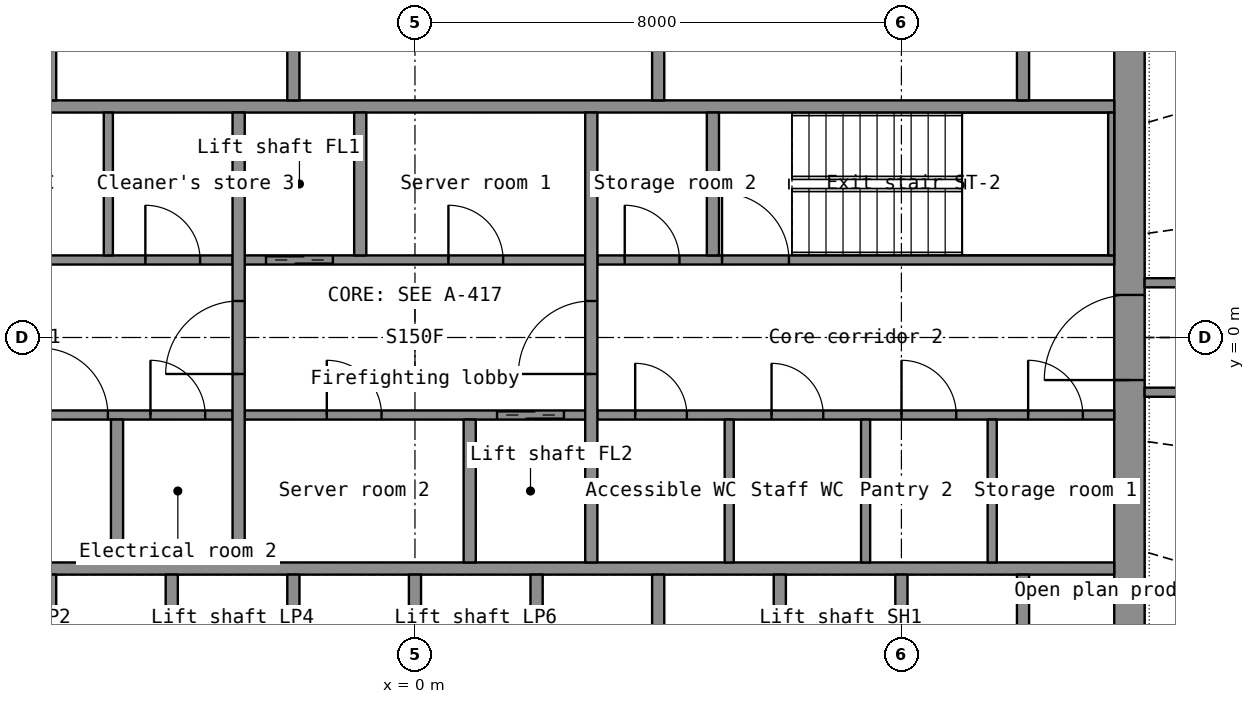
"""IFC4 building model, lengths in metres.
Left out: names, types, materials, properties, quantities, classifications, styles, units other than length and angle.
Written with IfcOpenShell. Run it as: python <this file> out.ifc"""

import sys

from ifc_helpers import new_model, si_unit, direction, frame, frame_2d, origin, place, context, subcontext, project, spatial, rectangle, extrude, element, fill, save


model = new_model("IFC4")
c1 = context("Model", 3, precision=1e-05, world=origin(), true_north=direction((0.0, 1.0)))
c2 = subcontext(c1, "Body", "Model", "MODEL_VIEW")
j1 = project(units=[si_unit("LENGTHUNIT", "METRE"), si_unit("PLANEANGLEUNIT", "RADIAN")], contexts=[c1])
p1 = place(None, origin())
s1 = spatial("IfcSite", under=j1, at=p1, CompositionType="ELEMENT")
p2 = place(p1, origin())
s2 = spatial("IfcBuilding", under=s1, at=p2, CompositionType="ELEMENT")
p3 = place(p2, frame((0.0, 0.0, 119.3)))
s3 = spatial("IfcBuildingStorey", under=s2, at=p3, CompositionType="ELEMENT", Elevation=119.3)
p4 = place(p3, frame((11.75, -7.2, 0.0), z_axis=(0.0, 0.0, 1.0), x_axis=(0.0, 1.0, 0.0)))
e1 = element("IfcWall", 1, at=p4, inside=s3, PredefinedType="SHEAR", context=c2, shape_type="SweptSolid", body=[
    extrude(rectangle(XDim=14.4, YDim=0.5, at=frame_2d((7.2, 0.0))), origin(), (0.0, 0.0, 1.0), 3.3),
])
p5 = place(p4, frame((6.5, 0.0, 0.0)))
e2 = element("IfcOpeningElement", 2, at=p5, cuts=e1, PredefinedType="OPENING", context=c2, shape_type="SweptSolid", body=[
    extrude(rectangle(XDim=1.4, YDim=2.2, at=frame_2d((0.7, 1.1))), frame((0.0, 0.26, 0.0), z_axis=(0.0, -1.0, 0.0), x_axis=(1.0, 0.0, 0.0)), (0.0, 0.0, 1.0), 0.52),
])
for number, where, z_axis, x_axis in (
    (3, (-11.5, -3.8, 0.0), (0.0, 0.0, 1.0), (1.0, 0.0, 0.0)),
    (4, (-11.5, 3.8, 0.0), (0.0, 0.0, 1.0), (1.0, 0.0, 0.0)),
):
    element("IfcWall", number, at=place(p3, frame(where, z_axis=z_axis, x_axis=x_axis)), inside=s3, PredefinedType="SHEAR", context=c2, shape_type="SweptSolid", body=[
        extrude(rectangle(XDim=23.0, YDim=0.2, at=frame_2d((11.5, 0.0))), origin(), (0.0, 0.0, 1.0), 3.3),
    ])
for number, where, z_axis, x_axis in (
    (5, (-6.0, -6.7, 0.0), (0.0, 0.0, 1.0), (0.0, 1.0, 0.0)),
    (6, (-4.0, -6.7, 0.0), (0.0, 0.0, 1.0), (0.0, 1.0, 0.0)),
    (7, (-2.0, -6.7, 0.0), (0.0, 0.0, 1.0), (0.0, 1.0, 0.0)),
    (8, (0.0, -6.7, 0.0), (0.0, 0.0, 1.0), (0.0, 1.0, 0.0)),
    (9, (2.0, -6.7, 0.0), (0.0, 0.0, 1.0), (0.0, 1.0, 0.0)),
    (10, (4.0, -6.7, 0.0), (0.0, 0.0, 1.0), (0.0, 1.0, 0.0)),
    (11, (6.0, -6.7, 0.0), (0.0, 0.0, 1.0), (0.0, 1.0, 0.0)),
    (12, (8.0, -6.7, 0.0), (0.0, 0.0, 1.0), (0.0, 1.0, 0.0)),
    (13, (10.0, -6.7, 0.0), (0.0, 0.0, 1.0), (0.0, 1.0, 0.0)),
    (14, (-6.0, 3.9, 0.0), (0.0, 0.0, 1.0), (0.0, 1.0, 0.0)),
    (15, (10.0, 3.9, 0.0), (0.0, 0.0, 1.0), (0.0, 1.0, 0.0)),
):
    element("IfcWall", number, at=place(p3, frame(where, z_axis=z_axis, x_axis=x_axis)), inside=s3, PredefinedType="SHEAR", context=c2, shape_type="SweptSolid", body=[
        extrude(rectangle(XDim=2.8, YDim=0.2, at=frame_2d((1.4, 0.0))), origin(), (0.0, 0.0, 1.0), 3.3),
    ])
for number, where, z_axis, x_axis in (
    (16, (-2.0, 3.9, 0.0), (0.0, 0.0, 1.0), (0.0, 1.0, 0.0)),
    (17, (4.0, 3.9, 0.0), (0.0, 0.0, 1.0), (0.0, 1.0, 0.0)),
):
    element("IfcWall", number, at=place(p3, frame(where, z_axis=z_axis, x_axis=x_axis)), inside=s3, PredefinedType="PARTITIONING", context=c2, shape_type="SweptSolid", body=[
        extrude(rectangle(XDim=2.8, YDim=0.2, at=frame_2d((1.4, 0.0))), origin(), (0.0, 0.0, 1.0), 3.3),
    ])
p6 = place(p3, frame((-11.5, -1.275, 0.0), z_axis=(0.0, 0.0, 1.0), x_axis=(1.0, 0.0, 0.0)))
e18 = element("IfcWall", 18, at=p6, inside=s3, PredefinedType="SHEAR", context=c2, shape_type="SweptSolid", body=[
    extrude(rectangle(XDim=8.5, YDim=0.15, at=frame_2d((4.25, 0.0))), origin(), (0.0, 0.0, 1.0), 3.3),
])
p7 = place(p6, frame((5.35, 0.0, 0.0)))
e19 = element("IfcOpeningElement", 19, at=p7, cuts=e18, PredefinedType="OPENING", context=c2, shape_type="SweptSolid", body=[
    extrude(rectangle(XDim=1.1, YDim=2.15, at=frame_2d((0.55, 1.075))), frame((0.0, 0.085, 0.0), z_axis=(0.0, -1.0, 0.0), x_axis=(1.0, 0.0, 0.0)), (0.0, 0.0, 1.0), 0.17),
])
p8 = place(p6, frame((7.15, 0.0, 0.0)))
e20 = element("IfcOpeningElement", 20, at=p8, cuts=e18, PredefinedType="OPENING", context=c2, shape_type="SweptSolid", body=[
    extrude(rectangle(XDim=0.9, YDim=2.1, at=frame_2d((0.45, 1.05))), frame((0.0, 0.085, 0.0), z_axis=(0.0, -1.0, 0.0), x_axis=(1.0, 0.0, 0.0)), (0.0, 0.0, 1.0), 0.17),
])
p9 = place(p3, frame((-2.8, -1.275, 0.0), z_axis=(0.0, 0.0, 1.0), x_axis=(1.0, 0.0, 0.0)))
e21 = element("IfcWall", 21, at=p9, inside=s3, PredefinedType="SHEAR", context=c2, shape_type="SweptSolid", body=[
    extrude(rectangle(XDim=5.6, YDim=0.15, at=frame_2d((2.8, 0.0))), origin(), (0.0, 0.0, 1.0), 3.3),
])
p10 = place(p9, frame((4.15, 0.0, 0.0)))
e22 = element("IfcOpeningElement", 22, at=p10, cuts=e21, PredefinedType="OPENING", context=c2, shape_type="SweptSolid", body=[
    extrude(rectangle(XDim=1.1, YDim=2.2, at=frame_2d((0.55, 1.1))), frame((0.0, 0.085, 0.0), z_axis=(0.0, -1.0, 0.0), x_axis=(1.0, 0.0, 0.0)), (0.0, 0.0, 1.0), 0.17),
])
p11 = place(p9, frame((1.35, 0.0, 0.0)))
e23 = element("IfcOpeningElement", 23, at=p11, cuts=e21, PredefinedType="OPENING", context=c2, shape_type="SweptSolid", body=[
    extrude(rectangle(XDim=0.9, YDim=2.1, at=frame_2d((0.45, 1.05))), frame((0.0, 0.085, 0.0), z_axis=(0.0, -1.0, 0.0), x_axis=(1.0, 0.0, 0.0)), (0.0, 0.0, 1.0), 0.17),
])
p12 = place(p3, frame((3.0, -1.275, 0.0), z_axis=(0.0, 0.0, 1.0), x_axis=(1.0, 0.0, 0.0)))
e24 = element("IfcWall", 24, at=p12, inside=s3, PredefinedType="PARTITIONING", context=c2, shape_type="SweptSolid", body=[
    extrude(rectangle(XDim=8.5, YDim=0.15, at=frame_2d((4.25, 0.0))), origin(), (0.0, 0.0, 1.0), 3.3),
])
p13 = place(p12, frame((0.622, 0.0, 0.0)))
e25 = element("IfcOpeningElement", 25, at=p13, cuts=e24, PredefinedType="OPENING", context=c2, shape_type="SweptSolid", body=[
    extrude(rectangle(XDim=0.85, YDim=2.1, at=frame_2d((0.425, 1.05))), frame((0.0, 0.085, 0.0), z_axis=(0.0, -1.0, 0.0), x_axis=(1.0, 0.0, 0.0)), (0.0, 0.0, 1.0), 0.17),
])
p14 = place(p12, frame((2.865, 0.0, 0.0)))
e26 = element("IfcOpeningElement", 26, at=p14, cuts=e24, PredefinedType="OPENING", context=c2, shape_type="SweptSolid", body=[
    extrude(rectangle(XDim=0.85, YDim=2.1, at=frame_2d((0.425, 1.05))), frame((0.0, 0.085, 0.0), z_axis=(0.0, -1.0, 0.0), x_axis=(1.0, 0.0, 0.0)), (0.0, 0.0, 1.0), 0.17),
])
p15 = place(p12, frame((5.002, 0.0, 0.0)))
e27 = element("IfcOpeningElement", 27, at=p15, cuts=e24, PredefinedType="OPENING", context=c2, shape_type="SweptSolid", body=[
    extrude(rectangle(XDim=0.9, YDim=2.1, at=frame_2d((0.45, 1.05))), frame((0.0, 0.085, 0.0), z_axis=(0.0, -1.0, 0.0), x_axis=(1.0, 0.0, 0.0)), (0.0, 0.0, 1.0), 0.17),
])
p16 = place(p12, frame((7.084, 0.0, 0.0)))
e28 = element("IfcOpeningElement", 28, at=p16, cuts=e24, PredefinedType="OPENING", context=c2, shape_type="SweptSolid", body=[
    extrude(rectangle(XDim=0.9, YDim=2.1, at=frame_2d((0.45, 1.05))), frame((0.0, 0.085, 0.0), z_axis=(0.0, -1.0, 0.0), x_axis=(1.0, 0.0, 0.0)), (0.0, 0.0, 1.0), 0.17),
])
p17 = place(p3, frame((-11.5, 1.275, 0.0), z_axis=(0.0, 0.0, 1.0), x_axis=(1.0, 0.0, 0.0)))
e29 = element("IfcWall", 29, at=p17, inside=s3, PredefinedType="PARTITIONING", context=c2, shape_type="SweptSolid", body=[
    extrude(rectangle(XDim=8.5, YDim=0.15, at=frame_2d((4.25, 0.0))), origin(), (0.0, 0.0, 1.0), 3.3),
])
p18 = place(p17, frame((1.133, 0.0, 0.0)))
e30 = element("IfcOpeningElement", 30, at=p18, cuts=e29, PredefinedType="OPENING", context=c2, shape_type="SweptSolid", body=[
    extrude(rectangle(XDim=0.85, YDim=2.1, at=frame_2d((0.425, 1.05))), frame((0.0, 0.085, 0.0), z_axis=(0.0, -1.0, 0.0), x_axis=(1.0, 0.0, 0.0)), (0.0, 0.0, 1.0), 0.17),
])
p19 = place(p17, frame((4.399, 0.0, 0.0)))
e31 = element("IfcOpeningElement", 31, at=p19, cuts=e29, PredefinedType="OPENING", context=c2, shape_type="SweptSolid", body=[
    extrude(rectangle(XDim=0.85, YDim=2.1, at=frame_2d((0.425, 1.05))), frame((0.0, 0.085, 0.0), z_axis=(0.0, -1.0, 0.0), x_axis=(1.0, 0.0, 0.0)), (0.0, 0.0, 1.0), 0.17),
])
p20 = place(p17, frame((7.066, 0.0, 0.0)))
e32 = element("IfcOpeningElement", 32, at=p20, cuts=e29, PredefinedType="OPENING", context=c2, shape_type="SweptSolid", body=[
    extrude(rectangle(XDim=0.9, YDim=2.1, at=frame_2d((0.45, 1.05))), frame((0.0, 0.085, 0.0), z_axis=(0.0, -1.0, 0.0), x_axis=(1.0, 0.0, 0.0)), (0.0, 0.0, 1.0), 0.17),
])
p21 = place(p3, frame((-2.8, 1.275, 0.0), z_axis=(0.0, 0.0, 1.0), x_axis=(1.0, 0.0, 0.0)))
e33 = element("IfcWall", 33, at=p21, inside=s3, PredefinedType="SHEAR", context=c2, shape_type="SweptSolid", body=[
    extrude(rectangle(XDim=5.6, YDim=0.15, at=frame_2d((2.8, 0.0))), origin(), (0.0, 0.0, 1.0), 3.3),
])
p22 = place(p21, frame((0.35, 0.0, 0.0)))
e34 = element("IfcOpeningElement", 34, at=p22, cuts=e33, PredefinedType="OPENING", context=c2, shape_type="SweptSolid", body=[
    extrude(rectangle(XDim=1.1, YDim=2.2, at=frame_2d((0.55, 1.1))), frame((0.0, 0.085, 0.0), z_axis=(0.0, -1.0, 0.0), x_axis=(1.0, 0.0, 0.0)), (0.0, 0.0, 1.0), 0.17),
])
p23 = place(p21, frame((3.35, 0.0, 0.0)))
e35 = element("IfcOpeningElement", 35, at=p23, cuts=e33, PredefinedType="OPENING", context=c2, shape_type="SweptSolid", body=[
    extrude(rectangle(XDim=0.9, YDim=2.1, at=frame_2d((0.45, 1.05))), frame((0.0, 0.085, 0.0), z_axis=(0.0, -1.0, 0.0), x_axis=(1.0, 0.0, 0.0)), (0.0, 0.0, 1.0), 0.17),
])
p24 = place(p3, frame((3.0, 1.275, 0.0), z_axis=(0.0, 0.0, 1.0), x_axis=(1.0, 0.0, 0.0)))
e36 = element("IfcWall", 36, at=p24, inside=s3, PredefinedType="SHEAR", context=c2, shape_type="SweptSolid", body=[
    extrude(rectangle(XDim=8.5, YDim=0.15, at=frame_2d((4.25, 0.0))), origin(), (0.0, 0.0, 1.0), 3.3),
])
p25 = place(p24, frame((2.05, 0.0, 0.0)))
e37 = element("IfcOpeningElement", 37, at=p25, cuts=e36, PredefinedType="OPENING", context=c2, shape_type="SweptSolid", body=[
    extrude(rectangle(XDim=1.1, YDim=2.15, at=frame_2d((0.55, 1.075))), frame((0.0, 0.085, 0.0), z_axis=(0.0, -1.0, 0.0), x_axis=(1.0, 0.0, 0.0)), (0.0, 0.0, 1.0), 0.17),
])
p26 = place(p24, frame((0.45, 0.0, 0.0)))
e38 = element("IfcOpeningElement", 38, at=p26, cuts=e36, PredefinedType="OPENING", context=c2, shape_type="SweptSolid", body=[
    extrude(rectangle(XDim=0.9, YDim=2.1, at=frame_2d((0.45, 1.05))), frame((0.0, 0.085, 0.0), z_axis=(0.0, -1.0, 0.0), x_axis=(1.0, 0.0, 0.0)), (0.0, 0.0, 1.0), 0.17),
])
p27 = place(p3, frame((-2.9, -3.7, 0.0), z_axis=(0.0, 0.0, 1.0), x_axis=(0.0, 1.0, 0.0)))
e39 = element("IfcWall", 39, at=p27, inside=s3, PredefinedType="SHEAR", context=c2, shape_type="SweptSolid", body=[
    extrude(rectangle(XDim=7.4, YDim=0.2, at=frame_2d((3.7, 0.0))), origin(), (0.0, 0.0, 1.0), 3.3),
])
p28 = place(p27, frame((3.1, 0.0, 0.0)))
e40 = element("IfcOpeningElement", 40, at=p28, cuts=e39, PredefinedType="OPENING", context=c2, shape_type="SweptSolid", body=[
    extrude(rectangle(XDim=1.2, YDim=2.2, at=frame_2d((0.6, 1.1))), frame((0.0, 0.11, 0.0), z_axis=(0.0, -1.0, 0.0), x_axis=(1.0, 0.0, 0.0)), (0.0, 0.0, 1.0), 0.22),
])
p29 = place(p3, frame((2.9, -3.7, 0.0), z_axis=(0.0, 0.0, 1.0), x_axis=(0.0, 1.0, 0.0)))
e41 = element("IfcWall", 41, at=p29, inside=s3, PredefinedType="SHEAR", context=c2, shape_type="SweptSolid", body=[
    extrude(rectangle(XDim=7.4, YDim=0.2, at=frame_2d((3.7, 0.0))), origin(), (0.0, 0.0, 1.0), 3.3),
])
p30 = place(p29, frame((3.1, 0.0, 0.0)))
e42 = element("IfcOpeningElement", 42, at=p30, cuts=e41, PredefinedType="OPENING", context=c2, shape_type="SweptSolid", body=[
    extrude(rectangle(XDim=1.2, YDim=2.2, at=frame_2d((0.6, 1.1))), frame((0.0, 0.11, 0.0), z_axis=(0.0, -1.0, 0.0), x_axis=(1.0, 0.0, 0.0)), (0.0, 0.0, 1.0), 0.22),
])
for number, where, z_axis, x_axis in (
    (43, (-0.9, 1.35, 0.0), (0.0, 0.0, 1.0), (0.0, 1.0, 0.0)),
    (44, (0.9, -3.7, 0.0), (0.0, 0.0, 1.0), (0.0, 1.0, 0.0)),
):
    element("IfcWall", number, at=place(p3, frame(where, z_axis=z_axis, x_axis=x_axis)), inside=s3, PredefinedType="SHEAR", context=c2, shape_type="SweptSolid", body=[
        extrude(rectangle(XDim=2.35, YDim=0.2, at=frame_2d((1.175, 0.0))), origin(), (0.0, 0.0, 1.0), 3.3),
    ])
p31 = place(p3, frame((11.45, 1.35, 0.0), z_axis=(0.0, 0.0, 1.0), x_axis=(0.0, 1.0, 0.0)))
e45 = element("IfcWall", 45, at=p31, inside=s3, PredefinedType="SHEAR", context=c2, shape_type="SweptSolid", body=[
    extrude(rectangle(XDim=2.35, YDim=0.1, at=frame_2d((1.175, 0.0))), origin(), (0.0, 0.0, 1.0), 3.3),
])
for number, where, z_axis, x_axis in (
    (46, (-4.9, -3.7, 0.0), (0.0, 0.0, 1.0), (0.0, 1.0, 0.0)),
    (47, (4.9, 1.35, 0.0), (0.0, 0.0, 1.0), (0.0, 1.0, 0.0)),
):
    element("IfcWall", number, at=place(p3, frame(where, z_axis=z_axis, x_axis=x_axis)), inside=s3, PredefinedType="SHEAR", context=c2, shape_type="SweptSolid", body=[
        extrude(rectangle(XDim=2.35, YDim=0.2, at=frame_2d((1.175, 0.0))), origin(), (0.0, 0.0, 1.0), 3.3),
    ])
for number, where, z_axis, x_axis in (
    (48, (-5.043, 1.35, 0.0), (0.0, 0.0, 1.0), (0.0, 1.0, 0.0)),
    (49, (5.168, -3.7, 0.0), (0.0, 0.0, 1.0), (0.0, 1.0, 0.0)),
    (50, (7.411, -3.7, 0.0), (0.0, 0.0, 1.0), (0.0, 1.0, 0.0)),
    (51, (9.493, -3.7, 0.0), (0.0, 0.0, 1.0), (0.0, 1.0, 0.0)),
):
    element("IfcWall", number, at=place(p3, frame(where, z_axis=z_axis, x_axis=x_axis)), inside=s3, PredefinedType="PARTITIONING", context=c2, shape_type="SweptSolid", body=[
        extrude(rectangle(XDim=2.35, YDim=0.15, at=frame_2d((1.175, 0.0))), origin(), (0.0, 0.0, 1.0), 3.3),
    ])
p32 = place(p3, frame((15.923, 0.9, 0.0), z_axis=(0.0, 0.0, 1.0), x_axis=(-1.0, 0.0, 0.0)))
e52 = element("IfcWall", 52, at=p32, inside=s3, PredefinedType="PARTITIONING", context=c2, shape_type="SweptSolid", body=[
    extrude(rectangle(XDim=3.923, YDim=0.15, at=frame_2d((1.961, 0.0))), origin(), (0.0, 0.0, 1.0), 2.4),
])
p33 = place(p3, frame((12.0, -0.9, 0.0), z_axis=(0.0, 0.0, 1.0), x_axis=(1.0, 0.0, 0.0)))
e53 = element("IfcWall", 53, at=p33, inside=s3, PredefinedType="PARTITIONING", context=c2, shape_type="SweptSolid", body=[
    extrude(rectangle(XDim=0.559, YDim=0.15, at=frame_2d((0.28, 0.0))), origin(), (0.0, 0.0, 1.0), 2.4),
])
p34 = place(p5, origin())
e54 = element("IfcDoor", 54, at=p34, inside=s3, OperationType="DOUBLE_DOOR_SINGLE_SWING", PredefinedType="DOOR", context=c2, shape_type="SweptSolid", body=[
    extrude(rectangle(XDim=1.4, YDim=2.2, at=frame_2d((0.7, 1.1))), frame((0.0, 0.025, 0.0), z_axis=(0.0, -1.0, 0.0), x_axis=(1.0, 0.0, 0.0)), (0.0, 0.0, 1.0), 0.05),
])
fill(e2, e54)
p35 = place(p28, origin())
e55 = element("IfcDoor", 55, at=p35, inside=s3, OperationType="SINGLE_SWING_LEFT", PredefinedType="DOOR", context=c2, shape_type="SweptSolid", body=[
    extrude(rectangle(XDim=1.2, YDim=2.2, at=frame_2d((0.6, 1.1))), frame((0.0, 0.025, 0.0), z_axis=(0.0, -1.0, 0.0), x_axis=(1.0, 0.0, 0.0)), (0.0, 0.0, 1.0), 0.05),
])
fill(e40, e55)
p36 = place(p30, origin())
e56 = element("IfcDoor", 56, at=p36, inside=s3, OperationType="SINGLE_SWING_LEFT", PredefinedType="DOOR", context=c2, shape_type="SweptSolid", body=[
    extrude(rectangle(XDim=1.2, YDim=2.2, at=frame_2d((0.6, 1.1))), frame((0.0, 0.025, 0.0), z_axis=(0.0, -1.0, 0.0), x_axis=(1.0, 0.0, 0.0)), (0.0, 0.0, 1.0), 0.05),
])
fill(e42, e56)
p37 = place(p22, origin())
e57 = element("IfcDoor", 57, at=p37, inside=s3, OperationType="DOUBLE_DOOR_SLIDING", PredefinedType="DOOR", context=c2, shape_type="SweptSolid", body=[
    extrude(rectangle(XDim=1.1, YDim=2.2, at=frame_2d((0.55, 1.1))), frame((0.0, 0.025, 0.0), z_axis=(0.0, -1.0, 0.0), x_axis=(1.0, 0.0, 0.0)), (0.0, 0.0, 1.0), 0.05),
])
fill(e34, e57)
p38 = place(p10, origin())
e58 = element("IfcDoor", 58, at=p38, inside=s3, OperationType="DOUBLE_DOOR_SLIDING", PredefinedType="DOOR", context=c2, shape_type="SweptSolid", body=[
    extrude(rectangle(XDim=1.1, YDim=2.2, at=frame_2d((0.55, 1.1))), frame((0.0, 0.025, 0.0), z_axis=(0.0, -1.0, 0.0), x_axis=(1.0, 0.0, 0.0)), (0.0, 0.0, 1.0), 0.05),
])
fill(e22, e58)
p39 = place(p7, origin())
e59 = element("IfcDoor", 59, at=p39, inside=s3, OperationType="SINGLE_SWING_LEFT", PredefinedType="DOOR", context=c2, shape_type="SweptSolid", body=[
    extrude(rectangle(XDim=1.1, YDim=2.15, at=frame_2d((0.55, 1.075))), frame((0.0, 0.025, 0.0), z_axis=(0.0, -1.0, 0.0), x_axis=(1.0, 0.0, 0.0)), (0.0, 0.0, 1.0), 0.05),
])
fill(e19, e59)
p40 = place(p25, origin())
e60 = element("IfcDoor", 60, at=p40, inside=s3, OperationType="SINGLE_SWING_LEFT", PredefinedType="DOOR", context=c2, shape_type="SweptSolid", body=[
    extrude(rectangle(XDim=1.1, YDim=2.15, at=frame_2d((0.55, 1.075))), frame((0.0, 0.025, 0.0), z_axis=(0.0, -1.0, 0.0), x_axis=(1.0, 0.0, 0.0)), (0.0, 0.0, 1.0), 0.05),
])
fill(e37, e60)
p41 = place(p20, origin())
e61 = element("IfcDoor", 61, at=p41, inside=s3, OperationType="SINGLE_SWING_LEFT", PredefinedType="DOOR", context=c2, shape_type="SweptSolid", body=[
    extrude(rectangle(XDim=0.9, YDim=2.1, at=frame_2d((0.45, 1.05))), frame((0.0, 0.025, 0.0), z_axis=(0.0, -1.0, 0.0), x_axis=(1.0, 0.0, 0.0)), (0.0, 0.0, 1.0), 0.05),
])
fill(e32, e61)
p42 = place(p13, origin())
e62 = element("IfcDoor", 62, at=p42, inside=s3, OperationType="SINGLE_SWING_LEFT", PredefinedType="DOOR", context=c2, shape_type="SweptSolid", body=[
    extrude(rectangle(XDim=0.85, YDim=2.1, at=frame_2d((0.425, 1.05))), frame((0.0, 0.025, 0.0), z_axis=(0.0, -1.0, 0.0), x_axis=(1.0, 0.0, 0.0)), (0.0, 0.0, 1.0), 0.05),
])
fill(e25, e62)
p43 = place(p14, origin())
e63 = element("IfcDoor", 63, at=p43, inside=s3, OperationType="SINGLE_SWING_LEFT", PredefinedType="DOOR", context=c2, shape_type="SweptSolid", body=[
    extrude(rectangle(XDim=0.85, YDim=2.1, at=frame_2d((0.425, 1.05))), frame((0.0, 0.025, 0.0), z_axis=(0.0, -1.0, 0.0), x_axis=(1.0, 0.0, 0.0)), (0.0, 0.0, 1.0), 0.05),
])
fill(e26, e63)
p44 = place(p15, origin())
e64 = element("IfcDoor", 64, at=p44, inside=s3, OperationType="SINGLE_SWING_LEFT", PredefinedType="DOOR", context=c2, shape_type="SweptSolid", body=[
    extrude(rectangle(XDim=0.9, YDim=2.1, at=frame_2d((0.45, 1.05))), frame((0.0, 0.025, 0.0), z_axis=(0.0, -1.0, 0.0), x_axis=(1.0, 0.0, 0.0)), (0.0, 0.0, 1.0), 0.05),
])
fill(e27, e64)
p45 = place(p16, origin())
e65 = element("IfcDoor", 65, at=p45, inside=s3, OperationType="SINGLE_SWING_LEFT", PredefinedType="DOOR", context=c2, shape_type="SweptSolid", body=[
    extrude(rectangle(XDim=0.9, YDim=2.1, at=frame_2d((0.45, 1.05))), frame((0.0, 0.025, 0.0), z_axis=(0.0, -1.0, 0.0), x_axis=(1.0, 0.0, 0.0)), (0.0, 0.0, 1.0), 0.05),
])
fill(e28, e65)
p46 = place(p23, origin())
e66 = element("IfcDoor", 66, at=p46, inside=s3, OperationType="SINGLE_SWING_LEFT", PredefinedType="DOOR", context=c2, shape_type="SweptSolid", body=[
    extrude(rectangle(XDim=0.9, YDim=2.1, at=frame_2d((0.45, 1.05))), frame((0.0, 0.025, 0.0), z_axis=(0.0, -1.0, 0.0), x_axis=(1.0, 0.0, 0.0)), (0.0, 0.0, 1.0), 0.05),
])
fill(e35, e66)
p47 = place(p11, origin())
e67 = element("IfcDoor", 67, at=p47, inside=s3, OperationType="SINGLE_SWING_LEFT", PredefinedType="DOOR", context=c2, shape_type="SweptSolid", body=[
    extrude(rectangle(XDim=0.9, YDim=2.1, at=frame_2d((0.45, 1.05))), frame((0.0, 0.025, 0.0), z_axis=(0.0, -1.0, 0.0), x_axis=(1.0, 0.0, 0.0)), (0.0, 0.0, 1.0), 0.05),
])
fill(e23, e67)
p48 = place(p26, origin())
e68 = element("IfcDoor", 68, at=p48, inside=s3, OperationType="SINGLE_SWING_LEFT", PredefinedType="DOOR", context=c2, shape_type="SweptSolid", body=[
    extrude(rectangle(XDim=0.9, YDim=2.1, at=frame_2d((0.45, 1.05))), frame((0.0, 0.025, 0.0), z_axis=(0.0, -1.0, 0.0), x_axis=(1.0, 0.0, 0.0)), (0.0, 0.0, 1.0), 0.05),
])
fill(e38, e68)
p49 = place(p8, origin())
e69 = element("IfcDoor", 69, at=p49, inside=s3, OperationType="SINGLE_SWING_LEFT", PredefinedType="DOOR", context=c2, shape_type="SweptSolid", body=[
    extrude(rectangle(XDim=0.9, YDim=2.1, at=frame_2d((0.45, 1.05))), frame((0.0, 0.025, 0.0), z_axis=(0.0, -1.0, 0.0), x_axis=(1.0, 0.0, 0.0)), (0.0, 0.0, 1.0), 0.05),
])
fill(e20, e69)
save(model, sys.argv[1])
